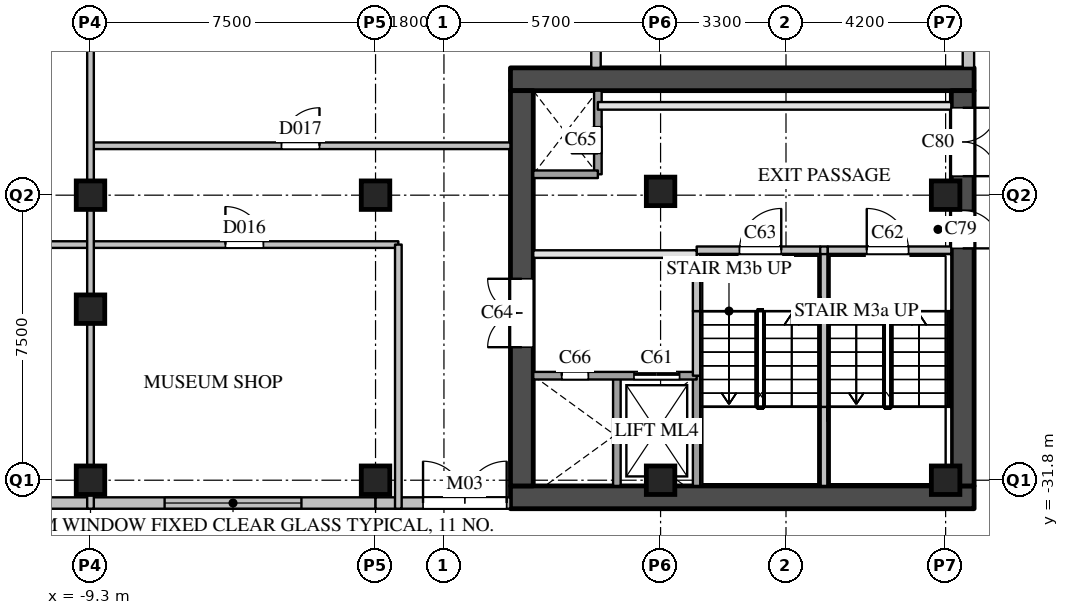
"""IFC4 building model, lengths in metres.
Left out: names, types, materials, properties, quantities, classifications, styles, units other than length and angle.
Written with IfcOpenShell. Run it as: python <this file> out.ifc"""

import sys

from ifc_helpers import new_model, si_unit, direction, frame, frame_2d, origin, origin_2d, place, context, subcontext, project, spatial, rectangle, extrude, element, fill, save


model = new_model("IFC4")
c1 = context("Model", 3, precision=1e-05, world=origin(), true_north=direction((0.0, 1.0)))
c2 = subcontext(c1, "Body", "Model", "MODEL_VIEW")
j1 = project(units=[si_unit("LENGTHUNIT", "METRE"), si_unit("PLANEANGLEUNIT", "RADIAN")], contexts=[c1])
p1 = place(None, origin())
s1 = spatial("IfcSite", under=j1, at=p1, CompositionType="ELEMENT")
p2 = place(p1, origin())
s2 = spatial("IfcBuilding", under=s1, at=p2, CompositionType="ELEMENT")
p3 = place(p2, origin())
s3 = spatial("IfcBuildingStorey", under=s2, at=p3, CompositionType="ELEMENT", Elevation=0.0)
for number, where, z_axis, x_axis in (
    (1, (-9.3, -31.8, 0.0), (0.0, 0.0, 1.0), (1.0, 0.0, 0.0)),
    (2, (-9.3, -24.3, 0.0), (0.0, 0.0, 1.0), (1.0, 0.0, 0.0)),
    (3, (-1.8, -31.8, 0.0), (0.0, 0.0, 1.0), (1.0, 0.0, 0.0)),
    (4, (-1.8, -24.3, 0.0), (0.0, 0.0, 1.0), (1.0, 0.0, 0.0)),
    (5, (5.7, -31.8, 0.0), (0.0, 0.0, 1.0), (1.0, 0.0, 0.0)),
    (6, (5.7, -24.2, 0.0), (0.0, 0.0, 1.0), (1.0, 0.0, 0.0)),
    (7, (13.2, -31.8, 0.0), (0.0, 0.0, 1.0), (1.0, 0.0, 0.0)),
    (8, (13.2, -24.3, 0.0), (0.0, 0.0, 1.0), (1.0, 0.0, 0.0)),
    (9, (-9.3, -27.3, 0.0), (0.0, 0.0, 1.0), (1.0, 0.0, 0.0)),
):
    element("IfcColumn", number, at=place(p3, frame(where, z_axis=z_axis, x_axis=x_axis)), inside=s3, PredefinedType="COLUMN", context=c2, shape_type="SweptSolid", body=[
        extrude(rectangle(XDim=0.75, YDim=0.75, at=origin_2d()), origin(), (0.0, 0.0, 1.0), 8.0),
    ])
p4 = place(p3, frame((-16.8, -32.4, 0.0), z_axis=(0.0, 0.0, 1.0), x_axis=(1.0, 0.0, 0.0)))
e10 = element("IfcWall", 10, at=p4, inside=s3, PredefinedType="SOLIDWALL", context=c2, shape_type="SweptSolid", body=[
    extrude(rectangle(XDim=7.5, YDim=0.3, at=frame_2d((3.75, 0.0))), origin(), (0.0, 0.0, 1.0), 7.59),
])
p5 = place(p4, frame((1.25, 0.0, 0.0)))
e11 = element("IfcOpeningElement", 11, at=p5, cuts=e10, PredefinedType="OPENING", context=c2, shape_type="SweptSolid", body=[
    extrude(rectangle(XDim=2.2, YDim=2.4, at=frame_2d((1.1, 1.2))), frame((0.0, 0.16, 0.0), z_axis=(0.0, -1.0, 0.0), x_axis=(1.0, 0.0, 0.0)), (0.0, 0.0, 1.0), 0.32),
])
p6 = place(p4, frame((4.05, 0.0, 0.0)))
e12 = element("IfcOpeningElement", 12, at=p6, cuts=e10, PredefinedType="OPENING", context=c2, shape_type="SweptSolid", body=[
    extrude(rectangle(XDim=2.2, YDim=2.4, at=frame_2d((1.1, 1.2))), frame((0.0, 0.16, 0.0), z_axis=(0.0, -1.0, 0.0), x_axis=(1.0, 0.0, 0.0)), (0.0, 0.0, 1.0), 0.32),
])
p7 = place(p3, frame((-9.3, -32.4, 0.0), z_axis=(0.0, 0.0, 1.0), x_axis=(1.0, 0.0, 0.0)))
e13 = element("IfcWall", 13, at=p7, inside=s3, PredefinedType="SOLIDWALL", context=c2, shape_type="SweptSolid", body=[
    extrude(rectangle(XDim=7.5, YDim=0.3, at=frame_2d((3.75, 0.0))), origin(), (0.0, 0.0, 1.0), 7.59),
])
p8 = place(p7, frame((1.95, 0.0, 0.9)))
e14 = element("IfcOpeningElement", 14, at=p8, cuts=e13, PredefinedType="OPENING", context=c2, shape_type="SweptSolid", body=[
    extrude(rectangle(XDim=3.6, YDim=3.0, at=frame_2d((1.8, 1.5))), frame((0.0, 0.16, 0.0), z_axis=(0.0, -1.0, 0.0), x_axis=(1.0, 0.0, 0.0)), (0.0, 0.0, 1.0), 0.32),
])
p9 = place(p3, frame((-1.8, -32.4, 0.0), z_axis=(0.0, 0.0, 1.0), x_axis=(1.0, 0.0, 0.0)))
e15 = element("IfcWall", 15, at=p9, inside=s3, PredefinedType="SOLIDWALL", context=c2, shape_type="SweptSolid", body=[
    extrude(rectangle(XDim=3.55, YDim=0.3, at=frame_2d((1.775, 0.0))), origin(), (0.0, 0.0, 1.0), 7.59),
])
p10 = place(p9, frame((1.25, 0.0, 0.0)))
e16 = element("IfcOpeningElement", 16, at=p10, cuts=e15, PredefinedType="OPENING", context=c2, shape_type="SweptSolid", body=[
    extrude(rectangle(XDim=2.2, YDim=2.4, at=frame_2d((1.1, 1.2))), frame((0.0, 0.16, 0.0), z_axis=(0.0, -1.0, 0.0), x_axis=(1.0, 0.0, 0.0)), (0.0, 0.0, 1.0), 0.32),
])
p11 = place(p3, frame((13.8, -20.95, 0.0), z_axis=(0.0, 0.0, 1.0), x_axis=(0.0, 1.0, 0.0)))
e17 = element("IfcWall", 17, at=p11, inside=s3, PredefinedType="SOLIDWALL", context=c2, shape_type="SweptSolid", body=[
    extrude(rectangle(XDim=4.15, YDim=0.3, at=frame_2d((2.075, 0.0))), origin(), (0.0, 0.0, 1.0), 7.59),
])
for number, where, z_axis, x_axis in (
    (18, (1.75, -32.25, 0.0), (0.0, 0.0, 1.0), (1.0, 0.0, 0.0)),
    (19, (1.75, -21.25, 0.0), (0.0, 0.0, 1.0), (1.0, 0.0, 0.0)),
):
    element("IfcWall", number, at=place(p3, frame(where, z_axis=z_axis, x_axis=x_axis)), inside=s3, PredefinedType="SHEAR", context=c2, shape_type="SweptSolid", body=[
        extrude(rectangle(XDim=12.2, YDim=0.6, at=frame_2d((6.1, 0.0))), origin(), (0.0, 0.0, 1.0), 7.59),
    ])
p12 = place(p3, frame((2.05, -31.95, 0.0), z_axis=(0.0, 0.0, 1.0), x_axis=(0.0, 1.0, 0.0)))
e20 = element("IfcWall", 20, at=p12, inside=s3, PredefinedType="SHEAR", context=c2, shape_type="SweptSolid", body=[
    extrude(rectangle(XDim=10.4, YDim=0.6, at=frame_2d((5.2, 0.0))), origin(), (0.0, 0.0, 1.0), 7.59),
])
p13 = place(p12, frame((3.65, 0.0, 0.0)))
e21 = element("IfcOpeningElement", 21, at=p13, cuts=e20, PredefinedType="OPENING", context=c2, shape_type="SweptSolid", body=[
    extrude(rectangle(XDim=1.8, YDim=2.1, at=frame_2d((0.9, 1.05))), frame((0.0, 0.31, 0.0), z_axis=(0.0, -1.0, 0.0), x_axis=(1.0, 0.0, 0.0)), (0.0, 0.0, 1.0), 0.62),
])
p14 = place(p3, frame((13.65, -31.95, 0.0), z_axis=(0.0, 0.0, 1.0), x_axis=(0.0, 1.0, 0.0)))
e22 = element("IfcWall", 22, at=p14, inside=s3, PredefinedType="SHEAR", context=c2, shape_type="SweptSolid", body=[
    extrude(rectangle(XDim=10.4, YDim=0.6, at=frame_2d((5.2, 0.0))), origin(), (0.0, 0.0, 1.0), 7.59),
])
p15 = place(p14, frame((7.25, 0.0, 0.0), z_axis=(0.0, 0.0, 1.0), x_axis=(-1.0, 0.0, 0.0)))
e23 = element("IfcOpeningElement", 23, at=p15, cuts=e22, PredefinedType="OPENING", context=c2, shape_type="SweptSolid", body=[
    extrude(rectangle(XDim=1.0, YDim=2.1, at=frame_2d((0.5, 1.05))), frame((0.0, 0.31, 0.0), z_axis=(0.0, -1.0, 0.0), x_axis=(1.0, 0.0, 0.0)), (0.0, 0.0, 1.0), 0.62),
])
p16 = place(p14, frame((9.95, 0.0, 0.0), z_axis=(0.0, 0.0, 1.0), x_axis=(-1.0, 0.0, 0.0)))
e24 = element("IfcOpeningElement", 24, at=p16, cuts=e22, PredefinedType="OPENING", context=c2, shape_type="SweptSolid", body=[
    extrude(rectangle(XDim=1.8, YDim=2.4, at=frame_2d((0.9, 1.2))), frame((0.0, 0.31, 0.0), z_axis=(0.0, -1.0, 0.0), x_axis=(1.0, 0.0, 0.0)), (0.0, 0.0, 1.0), 0.62),
])
p17 = place(p3, frame((4.05, -23.75, 0.0), z_axis=(0.0, 0.0, 1.0), x_axis=(0.0, 1.0, 0.0)))
e25 = element("IfcWall", 25, at=p17, inside=s3, PredefinedType="SOLIDWALL", context=c2, shape_type="SweptSolid", body=[
    extrude(rectangle(XDim=2.2, YDim=0.2, at=frame_2d((1.1, 0.0))), origin(), (0.0, 0.0, 1.0), 7.59),
])
p18 = place(p17, frame((0.55, 0.0, 0.0)))
e26 = element("IfcOpeningElement", 26, at=p18, cuts=e25, PredefinedType="OPENING", context=c2, shape_type="SweptSolid", body=[
    extrude(rectangle(XDim=0.7, YDim=2.1, at=frame_2d((0.35, 1.05))), frame((0.0, 0.11, 0.0), z_axis=(0.0, -1.0, 0.0), x_axis=(1.0, 0.0, 0.0)), (0.0, 0.0, 1.0), 0.22),
])
for number, where, z_axis, x_axis in (
    (27, (4.55, -31.95, 0.0), (0.0, 0.0, 1.0), (0.0, 1.0, 0.0)),
    (28, (6.65, -31.95, 0.0), (0.0, 0.0, 1.0), (0.0, 1.0, 0.0)),
):
    element("IfcWall", number, at=place(p3, frame(where, z_axis=z_axis, x_axis=x_axis)), inside=s3, PredefinedType="SOLIDWALL", context=c2, shape_type="SweptSolid", body=[
        extrude(rectangle(XDim=2.9, YDim=0.2, at=frame_2d((1.45, 0.0))), origin(), (0.0, 0.0, 1.0), 7.59),
    ])
p19 = place(p3, frame((6.65, -29.05, 0.0), z_axis=(0.0, 0.0, 1.0), x_axis=(0.0, 1.0, 0.0)))
e29 = element("IfcWall", 29, at=p19, inside=s3, PredefinedType="SOLIDWALL", context=c2, shape_type="SweptSolid", body=[
    extrude(rectangle(XDim=1.7, YDim=0.2, at=frame_2d((0.85, 0.0))), origin(), (0.0, 0.0, 1.0), 7.59),
])
p20 = place(p3, frame((6.65, -27.35, 0.0), z_axis=(0.0, 0.0, 1.0), x_axis=(0.0, 1.0, 0.0)))
e30 = element("IfcWall", 30, at=p20, inside=s3, PredefinedType="SOLIDWALL", context=c2, shape_type="SweptSolid", body=[
    extrude(rectangle(XDim=1.6, YDim=0.2, at=frame_2d((0.8, 0.0))), origin(), (0.0, 0.0, 1.0), 7.59),
])
p21 = place(p3, frame((10.0, -31.95, 0.0), z_axis=(0.0, 0.0, 1.0), x_axis=(0.0, 1.0, 0.0)))
e31 = element("IfcWall", 31, at=p21, inside=s3, PredefinedType="SOLIDWALL", context=c2, shape_type="SweptSolid", body=[
    extrude(rectangle(XDim=2.08, YDim=0.2, at=frame_2d((1.04, 0.0))), origin(), (0.0, 0.0, 1.0), 7.59),
])
p22 = place(p3, frame((10.0, -29.87, 0.0), z_axis=(0.0, 0.0, 1.0), x_axis=(0.0, 1.0, 0.0)))
e32 = element("IfcWall", 32, at=p22, inside=s3, PredefinedType="SOLIDWALL", context=c2, shape_type="SweptSolid", body=[
    extrude(rectangle(XDim=2.52, YDim=0.2, at=frame_2d((1.26, 0.0))), origin(), (0.0, 0.0, 1.0), 7.59),
])
p23 = place(p3, frame((10.0, -27.35, 0.0), z_axis=(0.0, 0.0, 1.0), x_axis=(0.0, 1.0, 0.0)))
e33 = element("IfcWall", 33, at=p23, inside=s3, PredefinedType="SOLIDWALL", context=c2, shape_type="SweptSolid", body=[
    extrude(rectangle(XDim=1.6, YDim=0.2, at=frame_2d((0.8, 0.0))), origin(), (0.0, 0.0, 1.0), 7.59),
])
p24 = place(p3, frame((2.35, -29.05, 0.0), z_axis=(0.0, 0.0, 1.0), x_axis=(1.0, 0.0, 0.0)))
e34 = element("IfcWall", 34, at=p24, inside=s3, PredefinedType="SOLIDWALL", context=c2, shape_type="SweptSolid", body=[
    extrude(rectangle(XDim=4.3, YDim=0.2, at=frame_2d((2.15, 0.0))), origin(), (0.0, 0.0, 1.0), 7.59),
])
p25 = place(p24, frame((2.65, 0.0, 0.0)))
e35 = element("IfcOpeningElement", 35, at=p25, cuts=e34, PredefinedType="OPENING", context=c2, shape_type="SweptSolid", body=[
    extrude(rectangle(XDim=1.2, YDim=2.1, at=frame_2d((0.6, 1.05))), frame((0.0, 0.11, 0.0), z_axis=(0.0, -1.0, 0.0), x_axis=(1.0, 0.0, 0.0)), (0.0, 0.0, 1.0), 0.22),
])
p26 = place(p24, frame((0.75, 0.0, 0.0)))
e36 = element("IfcOpeningElement", 36, at=p26, cuts=e34, PredefinedType="OPENING", context=c2, shape_type="SweptSolid", body=[
    extrude(rectangle(XDim=0.7, YDim=2.1, at=frame_2d((0.35, 1.05))), frame((0.0, 0.11, 0.0), z_axis=(0.0, -1.0, 0.0), x_axis=(1.0, 0.0, 0.0)), (0.0, 0.0, 1.0), 0.22),
])
p27 = place(p3, frame((2.35, -25.85, 0.0), z_axis=(0.0, 0.0, 1.0), x_axis=(1.0, 0.0, 0.0)))
e37 = element("IfcWall", 37, at=p27, inside=s3, PredefinedType="PARTITIONING", context=c2, shape_type="SweptSolid", body=[
    extrude(rectangle(XDim=4.3, YDim=0.2, at=frame_2d((2.15, 0.0))), origin(), (0.0, 0.0, 1.0), 7.59),
])
p28 = place(p3, frame((6.65, -25.75, 0.0), z_axis=(0.0, 0.0, 1.0), x_axis=(1.0, 0.0, 0.0)))
e38 = element("IfcWall", 38, at=p28, inside=s3, PredefinedType="SOLIDWALL", context=c2, shape_type="SweptSolid", body=[
    extrude(rectangle(XDim=3.25, YDim=0.2, at=frame_2d((1.625, 0.0))), origin(), (0.0, 0.0, 1.0), 7.59),
])
p29 = place(p28, frame((1.125, 0.0, 0.0)))
e39 = element("IfcOpeningElement", 39, at=p29, cuts=e38, PredefinedType="OPENING", context=c2, shape_type="SweptSolid", body=[
    extrude(rectangle(XDim=1.1, YDim=2.1, at=frame_2d((0.55, 1.05))), frame((0.0, 0.11, 0.0), z_axis=(0.0, -1.0, 0.0), x_axis=(1.0, 0.0, 0.0)), (0.0, 0.0, 1.0), 0.22),
])
p30 = place(p3, frame((9.9, -25.75, 0.0), z_axis=(0.0, 0.0, 1.0), x_axis=(1.0, 0.0, 0.0)))
e40 = element("IfcWall", 40, at=p30, inside=s3, PredefinedType="SOLIDWALL", context=c2, shape_type="SweptSolid", body=[
    extrude(rectangle(XDim=0.2, YDim=0.2, at=frame_2d((0.1, 0.0))), origin(), (0.0, 0.0, 1.0), 7.59),
])
p31 = place(p3, frame((10.1, -25.75, 0.0), z_axis=(0.0, 0.0, 1.0), x_axis=(1.0, 0.0, 0.0)))
e41 = element("IfcWall", 41, at=p31, inside=s3, PredefinedType="SOLIDWALL", context=c2, shape_type="SweptSolid", body=[
    extrude(rectangle(XDim=3.25, YDim=0.2, at=frame_2d((1.625, 0.0))), origin(), (0.0, 0.0, 1.0), 7.59),
])
p32 = place(p31, frame((1.025, 0.0, 0.0)))
e42 = element("IfcOpeningElement", 42, at=p32, cuts=e41, PredefinedType="OPENING", context=c2, shape_type="SweptSolid", body=[
    extrude(rectangle(XDim=1.1, YDim=2.1, at=frame_2d((0.55, 1.05))), frame((0.0, 0.11, 0.0), z_axis=(0.0, -1.0, 0.0), x_axis=(1.0, 0.0, 0.0)), (0.0, 0.0, 1.0), 0.22),
])
p33 = place(p3, frame((2.35, -23.75, 0.0), z_axis=(0.0, 0.0, 1.0), x_axis=(1.0, 0.0, 0.0)))
e43 = element("IfcWall", 43, at=p33, inside=s3, PredefinedType="SOLIDWALL", context=c2, shape_type="SweptSolid", body=[
    extrude(rectangle(XDim=1.7, YDim=0.2, at=frame_2d((0.85, 0.0))), origin(), (0.0, 0.0, 1.0), 7.59),
])
p34 = place(p3, frame((4.05, -21.95, 0.0), z_axis=(0.0, 0.0, 1.0), x_axis=(1.0, 0.0, 0.0)))
e44 = element("IfcWall", 44, at=p34, inside=s3, PredefinedType="PARTITIONING", context=c2, shape_type="SweptSolid", body=[
    extrude(rectangle(XDim=9.3, YDim=0.2, at=frame_2d((4.65, 0.0))), origin(), (0.0, 0.0, 1.0), 7.59),
])
p35 = place(p3, frame((-20.35, -25.6, 0.0), z_axis=(0.0, 0.0, 1.0), x_axis=(1.0, 0.0, 0.0)))
e45 = element("IfcWall", 45, at=p35, inside=s3, PredefinedType="PARTITIONING", context=c2, shape_type="SweptSolid", body=[
    extrude(rectangle(XDim=19.15, YDim=0.175, at=frame_2d((9.575, 0.0))), origin(), (0.0, 0.0, 1.0), 6.79),
])
p36 = place(p35, frame((4.625, 0.0, 0.0)))
e46 = element("IfcOpeningElement", 46, at=p36, cuts=e45, PredefinedType="OPENING", context=c2, shape_type="SweptSolid", body=[
    extrude(rectangle(XDim=1.8, YDim=2.1, at=frame_2d((0.9, 1.05))), frame((0.0, 0.097, 0.0), z_axis=(0.0, -1.0, 0.0), x_axis=(1.0, 0.0, 0.0)), (0.0, 0.0, 1.0), 0.195),
])
p37 = place(p35, frame((14.6, 0.0, 0.0)))
e47 = element("IfcOpeningElement", 47, at=p37, cuts=e45, PredefinedType="OPENING", context=c2, shape_type="SweptSolid", body=[
    extrude(rectangle(XDim=1.0, YDim=2.1, at=frame_2d((0.5, 1.05))), frame((0.0, 0.097, 0.0), z_axis=(0.0, -1.0, 0.0), x_axis=(1.0, 0.0, 0.0)), (0.0, 0.0, 1.0), 0.195),
])
p38 = place(p3, frame((-9.3, -23.0, 0.0), z_axis=(0.0, 0.0, 1.0), x_axis=(1.0, 0.0, 0.0)))
e48 = element("IfcWall", 48, at=p38, inside=s3, PredefinedType="PARTITIONING", context=c2, shape_type="SweptSolid", body=[
    extrude(rectangle(XDim=11.05, YDim=0.175, at=frame_2d((5.525, 0.0))), origin(), (0.0, 0.0, 1.0), 6.79),
])
p39 = place(p38, frame((5.025, 0.0, 0.0)))
e49 = element("IfcOpeningElement", 49, at=p39, cuts=e48, PredefinedType="OPENING", context=c2, shape_type="SweptSolid", body=[
    extrude(rectangle(XDim=1.0, YDim=2.1, at=frame_2d((0.5, 1.05))), frame((0.0, 0.097, 0.0), z_axis=(0.0, -1.0, 0.0), x_axis=(1.0, 0.0, 0.0)), (0.0, 0.0, 1.0), 0.195),
])
p40 = place(p3, frame((-9.3, -32.55, 0.0), z_axis=(0.0, 0.0, 1.0), x_axis=(0.0, 1.0, 0.0)))
e50 = element("IfcWall", 50, at=p40, inside=s3, PredefinedType="PARTITIONING", context=c2, shape_type="SweptSolid", body=[
    extrude(rectangle(XDim=23.25, YDim=0.175, at=frame_2d((11.625, 0.0))), origin(), (0.0, 0.0, 1.0), 6.79),
])
p41 = place(p3, frame((-1.2, -32.55, 0.0), z_axis=(0.0, 0.0, 1.0), x_axis=(0.0, 1.0, 0.0)))
e51 = element("IfcWall", 51, at=p41, inside=s3, PredefinedType="PARTITIONING", context=c2, shape_type="SweptSolid", body=[
    extrude(rectangle(XDim=6.95, YDim=0.175, at=frame_2d((3.475, 0.0))), origin(), (0.0, 0.0, 1.0), 7.59),
])
p42 = place(p3, frame((4.0, -20.95, 0.0), z_axis=(0.0, 0.0, 1.0), x_axis=(0.0, 1.0, 0.0)))
e52 = element("IfcWall", 52, at=p42, inside=s3, PredefinedType="PARTITIONING", context=c2, shape_type="SweptSolid", body=[
    extrude(rectangle(XDim=6.825, YDim=0.25, at=frame_2d((3.413, 0.0))), origin(), (0.0, 0.0, 1.0), 7.59),
])
p43 = place(p8, origin())
e53 = element("IfcWindow", 53, at=p43, inside=s3, PartitioningType="SINGLE_PANEL", PredefinedType="WINDOW", context=c2, shape_type="SweptSolid", body=[
    extrude(rectangle(XDim=3.6, YDim=3.0, at=frame_2d((1.8, 1.5))), frame((0.0, 0.03, 0.0), z_axis=(0.0, -1.0, 0.0), x_axis=(1.0, 0.0, 0.0)), (0.0, 0.0, 1.0), 0.06),
])
fill(e14, e53)
p44 = place(p10, origin())
e54 = element("IfcDoor", 54, at=p44, inside=s3, OperationType="DOUBLE_DOOR_SINGLE_SWING", PredefinedType="DOOR", context=c2, shape_type="SweptSolid", body=[
    extrude(rectangle(XDim=2.2, YDim=2.4, at=frame_2d((1.1, 1.2))), frame((0.0, 0.025, 0.0), z_axis=(0.0, -1.0, 0.0), x_axis=(1.0, 0.0, 0.0)), (0.0, 0.0, 1.0), 0.05),
])
fill(e16, e54)
p45 = place(p25, origin())
e55 = element("IfcDoor", 55, at=p45, inside=s3, OperationType="SLIDING_TO_LEFT", PredefinedType="DOOR", context=c2, shape_type="SweptSolid", body=[
    extrude(rectangle(XDim=1.2, YDim=2.1, at=frame_2d((0.6, 1.05))), frame((0.0, 0.025, 0.0), z_axis=(0.0, -1.0, 0.0), x_axis=(1.0, 0.0, 0.0)), (0.0, 0.0, 1.0), 0.05),
])
fill(e35, e55)
p46 = place(p32, origin())
e56 = element("IfcDoor", 56, at=p46, inside=s3, OperationType="SINGLE_SWING_LEFT", PredefinedType="DOOR", context=c2, shape_type="SweptSolid", body=[
    extrude(rectangle(XDim=1.1, YDim=2.1, at=frame_2d((0.55, 1.05))), frame((0.0, 0.025, 0.0), z_axis=(0.0, -1.0, 0.0), x_axis=(1.0, 0.0, 0.0)), (0.0, 0.0, 1.0), 0.05),
])
fill(e42, e56)
p47 = place(p29, origin())
e57 = element("IfcDoor", 57, at=p47, inside=s3, OperationType="SINGLE_SWING_RIGHT", PredefinedType="DOOR", context=c2, shape_type="SweptSolid", body=[
    extrude(rectangle(XDim=1.1, YDim=2.1, at=frame_2d((0.55, 1.05))), frame((0.0, 0.025, 0.0), z_axis=(0.0, -1.0, 0.0), x_axis=(1.0, 0.0, 0.0)), (0.0, 0.0, 1.0), 0.05),
])
fill(e39, e57)
p48 = place(p13, origin())
e58 = element("IfcDoor", 58, at=p48, inside=s3, OperationType="DOUBLE_DOOR_SINGLE_SWING", PredefinedType="DOOR", context=c2, shape_type="SweptSolid", body=[
    extrude(rectangle(XDim=1.8, YDim=2.1, at=frame_2d((0.9, 1.05))), frame((0.0, 0.025, 0.0), z_axis=(0.0, -1.0, 0.0), x_axis=(1.0, 0.0, 0.0)), (0.0, 0.0, 1.0), 0.05),
])
fill(e21, e58)
p49 = place(p18, origin())
e59 = element("IfcDoor", 59, at=p49, inside=s3, OperationType="SINGLE_SWING_LEFT", PredefinedType="DOOR", context=c2, shape_type="SweptSolid", body=[
    extrude(rectangle(XDim=0.7, YDim=2.1, at=frame_2d((0.35, 1.05))), frame((0.0, 0.025, 0.0), z_axis=(0.0, -1.0, 0.0), x_axis=(1.0, 0.0, 0.0)), (0.0, 0.0, 1.0), 0.05),
])
fill(e26, e59)
p50 = place(p26, origin())
e60 = element("IfcDoor", 60, at=p50, inside=s3, OperationType="SINGLE_SWING_LEFT", PredefinedType="DOOR", context=c2, shape_type="SweptSolid", body=[
    extrude(rectangle(XDim=0.7, YDim=2.1, at=frame_2d((0.35, 1.05))), frame((0.0, 0.025, 0.0), z_axis=(0.0, -1.0, 0.0), x_axis=(1.0, 0.0, 0.0)), (0.0, 0.0, 1.0), 0.05),
])
fill(e36, e60)
p51 = place(p15, origin())
e61 = element("IfcDoor", 61, at=p51, inside=s3, OperationType="SINGLE_SWING_RIGHT", PredefinedType="DOOR", context=c2, shape_type="SweptSolid", body=[
    extrude(rectangle(XDim=1.0, YDim=2.1, at=frame_2d((0.5, 1.05))), frame((0.0, 0.025, 0.0), z_axis=(0.0, -1.0, 0.0), x_axis=(1.0, 0.0, 0.0)), (0.0, 0.0, 1.0), 0.05),
])
fill(e23, e61)
p52 = place(p16, origin())
e62 = element("IfcDoor", 62, at=p52, inside=s3, OperationType="DOUBLE_DOOR_SINGLE_SWING", PredefinedType="DOOR", context=c2, shape_type="SweptSolid", body=[
    extrude(rectangle(XDim=1.8, YDim=2.4, at=frame_2d((0.9, 1.2))), frame((0.0, 0.025, 0.0), z_axis=(0.0, -1.0, 0.0), x_axis=(1.0, 0.0, 0.0)), (0.0, 0.0, 1.0), 0.05),
])
fill(e24, e62)
p53 = place(p37, origin())
e63 = element("IfcDoor", 63, at=p53, inside=s3, OperationType="SINGLE_SWING_LEFT", PredefinedType="DOOR", context=c2, shape_type="SweptSolid", body=[
    extrude(rectangle(XDim=1.0, YDim=2.1, at=frame_2d((0.5, 1.05))), frame((0.0, 0.025, 0.0), z_axis=(0.0, -1.0, 0.0), x_axis=(1.0, 0.0, 0.0)), (0.0, 0.0, 1.0), 0.05),
])
fill(e47, e63)
p54 = place(p39, origin())
e64 = element("IfcDoor", 64, at=p54, inside=s3, OperationType="SINGLE_SWING_RIGHT", PredefinedType="DOOR", context=c2, shape_type="SweptSolid", body=[
    extrude(rectangle(XDim=1.0, YDim=2.1, at=frame_2d((0.5, 1.05))), frame((0.0, 0.025, 0.0), z_axis=(0.0, -1.0, 0.0), x_axis=(1.0, 0.0, 0.0)), (0.0, 0.0, 1.0), 0.05),
])
fill(e49, e64)
save(model, sys.argv[1])
